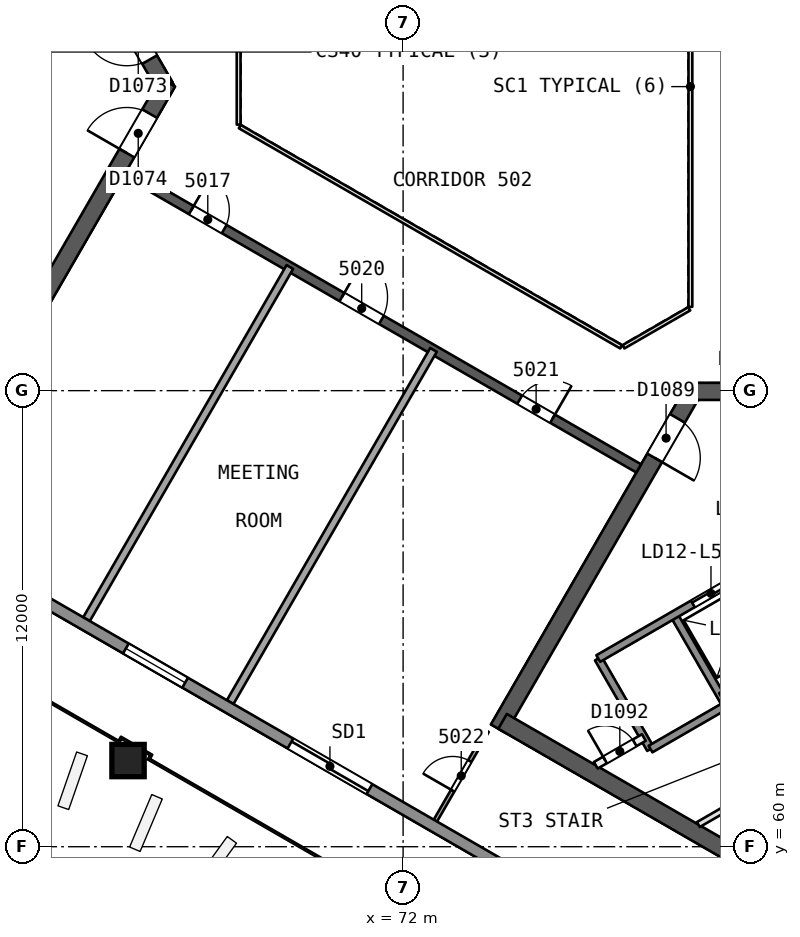
"""IFC4 building model, lengths in metres.
Left out: names, types, materials, properties, quantities, classifications, styles, units other than length and angle.
Written with IfcOpenShell. Run it as: python <this file> out.ifc"""

import sys

from ifc_helpers import new_model, si_unit, direction, frame, frame_2d, origin, origin_2d, place, context, subcontext, project, spatial, rectangle, extrude, element, fill, save


model = new_model("IFC4")
c1 = context("Model", 3, precision=1e-05, world=origin(), true_north=direction((0.0, 1.0)))
c2 = subcontext(c1, "Body", "Model", "MODEL_VIEW")
j1 = project(units=[si_unit("LENGTHUNIT", "METRE"), si_unit("PLANEANGLEUNIT", "RADIAN")], contexts=[c1])
p1 = place(None, origin())
s1 = spatial("IfcSite", under=j1, at=p1, CompositionType="ELEMENT")
p2 = place(p1, origin())
s2 = spatial("IfcBuilding", under=s1, at=p2, CompositionType="ELEMENT")
p3 = place(p2, frame((0.0, 0.0, 205.8)))
s3 = spatial("IfcBuildingStorey", under=s2, at=p3, CompositionType="ELEMENT", Elevation=205.8)
p4 = place(p3, frame((65.74, 80.0, 0.0), z_axis=(0.0, 0.0, 1.0), x_axis=(-0.499991857942, 0.866030104553, 0.0)))
e1 = element("IfcWall", 1, at=p4, inside=s3, PredefinedType="SHEAR", context=c2, shape_type="SweptSolid", body=[
    extrude(rectangle(XDim=10.25, YDim=0.45, at=frame_2d((5.125, 0.0))), origin(), (0.0, 0.0, 1.0), 3.7),
])
p5 = place(p4, frame((0.82, 0.0, 0.0)))
e2 = element("IfcOpeningElement", 2, at=p5, cuts=e1, PredefinedType="OPENING", context=c2, shape_type="SweptSolid", body=[
    extrude(rectangle(XDim=1.2, YDim=2.1, at=frame_2d((0.6, 1.05))), frame((0.0, 0.235, 0.0), z_axis=(0.0, -1.0, 0.0), x_axis=(1.0, 0.0, 0.0)), (0.0, 0.0, 1.0), 0.471),
])
p6 = place(p3, frame((60.728, 71.318, 0.0), z_axis=(0.0, 0.0, 1.0), x_axis=(0.500012416173, 0.866018235185, 0.0)))
e3 = element("IfcWall", 3, at=p6, inside=s3, PredefinedType="SHEAR", context=c2, shape_type="SweptSolid", body=[
    extrude(rectangle(XDim=10.155, YDim=0.45, at=frame_2d((5.078, 0.0))), origin(), (0.0, 0.0, 1.0), 3.7),
])
p7 = place(p6, frame((8.005, 0.0, 0.0)))
e4 = element("IfcOpeningElement", 4, at=p7, cuts=e3, PredefinedType="OPENING", context=c2, shape_type="SweptSolid", body=[
    extrude(rectangle(XDim=1.2, YDim=2.1, at=frame_2d((0.6, 1.05))), frame((0.0, 0.235, 0.0), z_axis=(0.0, -1.0, 0.0), x_axis=(1.0, 0.0, 0.0)), (0.0, 0.0, 1.0), 0.471),
])
p8 = place(p3, frame((79.63, 71.981, 0.0), z_axis=(0.0, 0.0, 1.0), x_axis=(-0.500002171595, -0.86602415001, 0.0)))
e5 = element("IfcWall", 5, at=p8, inside=s3, PredefinedType="SHEAR", context=c2, shape_type="SweptSolid", body=[
    extrude(rectangle(XDim=10.25, YDim=0.45, at=frame_2d((5.125, 0.0))), origin(), (0.0, 0.0, 1.0), 3.7),
])
p9 = place(p8, frame((0.82, 0.0, 0.0)))
e6 = element("IfcOpeningElement", 6, at=p9, cuts=e5, PredefinedType="OPENING", context=c2, shape_type="SweptSolid", body=[
    extrude(rectangle(XDim=1.2, YDim=2.1, at=frame_2d((0.6, 1.05))), frame((0.0, 0.235, 0.0), z_axis=(0.0, -1.0, 0.0), x_axis=(1.0, 0.0, 0.0)), (0.0, 0.0, 1.0), 0.471),
])
p10 = place(p3, frame((74.617, 63.299, 0.0), z_axis=(0.0, 0.0, 1.0), x_axis=(0.86602594008, -0.499999071108, 0.0)))
e7 = element("IfcWall", 7, at=p10, inside=s3, PredefinedType="SHEAR", context=c2, shape_type="SweptSolid", body=[
    extrude(rectangle(XDim=14.108, YDim=0.45, at=frame_2d((7.054, 0.0))), origin(), (0.0, 0.0, 1.0), 3.7),
])
p11 = place(p3, frame((89.655, 71.981, 0.0), z_axis=(0.0, 0.0, 1.0), x_axis=(-1.0, 0.0, 0.0)))
e8 = element("IfcWall", 8, at=p11, inside=s3, PredefinedType="SHEAR", context=c2, shape_type="SweptSolid", body=[
    extrude(rectangle(XDim=10.155, YDim=0.45, at=frame_2d((5.078, 0.0))), origin(), (0.0, 0.0, 1.0), 3.7),
])
p12 = place(p11, frame((8.005, 0.0, 0.0)))
e9 = element("IfcOpeningElement", 9, at=p12, cuts=e8, PredefinedType="OPENING", context=c2, shape_type="SweptSolid", body=[
    extrude(rectangle(XDim=1.2, YDim=2.1, at=frame_2d((0.6, 1.05))), frame((0.0, 0.235, 0.0), z_axis=(0.0, -1.0, 0.0), x_axis=(1.0, 0.0, 0.0)), (0.0, 0.0, 1.0), 0.471),
])
p13 = place(p3, frame((64.7, 77.748, 0.0), z_axis=(0.0, 0.0, 1.0), x_axis=(0.866026492143, -0.499998114903, 0.0)))
e10 = element("IfcWall", 10, at=p13, inside=s3, PredefinedType="SHEAR", context=c2, shape_type="SweptSolid", body=[
    extrude(rectangle(XDim=15.588, YDim=0.25, at=frame_2d((7.794, 0.0))), origin(), (0.0, 0.0, 1.0), 3.3),
])
p14 = place(p13, frame((1.994, 0.0, 0.0)))
e11 = element("IfcOpeningElement", 11, at=p14, cuts=e10, PredefinedType="OPENING", context=c2, shape_type="SweptSolid", body=[
    extrude(rectangle(XDim=1.0, YDim=2.1, at=frame_2d((0.5, 1.05))), frame((0.0, 0.135, 0.0), z_axis=(0.0, -1.0, 0.0), x_axis=(1.0, 0.0, 0.0)), (0.0, 0.0, 1.0), 0.271),
])
p15 = place(p13, frame((6.571, 0.0, 0.0)))
e12 = element("IfcOpeningElement", 12, at=p15, cuts=e10, PredefinedType="OPENING", context=c2, shape_type="SweptSolid", body=[
    extrude(rectangle(XDim=1.2, YDim=2.4, at=frame_2d((0.6, 1.2))), frame((0.0, 0.135, 0.0), z_axis=(0.0, -1.0, 0.0), x_axis=(1.0, 0.0, 0.0)), (0.0, 0.0, 1.0), 0.271),
])
p16 = place(p13, frame((11.971, 0.0, 0.0)))
e13 = element("IfcOpeningElement", 13, at=p16, cuts=e10, PredefinedType="OPENING", context=c2, shape_type="SweptSolid", body=[
    extrude(rectangle(XDim=1.0, YDim=2.1, at=frame_2d((0.5, 1.05))), frame((0.0, 0.135, 0.0), z_axis=(0.0, -1.0, 0.0), x_axis=(1.0, 0.0, 0.0)), (0.0, 0.0, 1.0), 0.271),
])
p17 = place(p3, frame((64.75, 62.246, 0.0), z_axis=(0.010093620709, 0.017482414954, 0.999796221231), x_axis=(-0.866022643586, 0.500004780773, 1.3036e-08)))
e14 = element("IfcColumn", 14, at=p17, inside=s3, PredefinedType="COLUMN", context=c2, shape_type="SweptSolid", body=[
    extrude(rectangle(XDim=0.85, YDim=0.85, at=origin_2d()), origin(), (0.0, 0.0, 1.0), 3.701),
])
for number, where, z_axis, x_axis in (
    (15, (63.669, 65.986, 0.0), (0.0, 0.0, 1.0), (0.5, 0.866, 0.0)),
    (16, (67.449, 63.804, 0.0), (0.0, 0.0, 1.0), (0.5, 0.866, 0.0)),
):
    element("IfcWall", number, at=place(p3, frame(where, z_axis=z_axis, x_axis=x_axis)), inside=s3, PredefinedType="PARTITIONING", context=c2, shape_type="SweptSolid", body=[
        extrude(rectangle(XDim=10.702, YDim=0.2, at=frame_2d((5.351, 0.0))), origin(), (0.0, 0.0, 1.0), 3.3),
    ])
p18 = place(p3, frame((72.849, 60.686, 0.0), z_axis=(0.0, 0.0, 1.0), x_axis=(0.499957886064, 0.866049716911, 0.0)))
e17 = element("IfcWall", 17, at=p18, inside=s3, PredefinedType="PARTITIONING", context=c2, shape_type="SweptSolid", body=[
    extrude(rectangle(XDim=2.723, YDim=0.1, at=frame_2d((1.361, 0.0))), origin(), (0.0, 0.0, 1.0), 3.3),
])
p19 = place(p18, frame((0.911, 0.0, 0.0)))
e18 = element("IfcOpeningElement", 18, at=p19, cuts=e17, PredefinedType="OPENING", context=c2, shape_type="SweptSolid", body=[
    extrude(rectangle(XDim=0.9, YDim=2.1, at=frame_2d((0.45, 1.05))), frame((0.0, 0.061, 0.0), z_axis=(0.0, -1.0, 0.0), x_axis=(1.0, 0.0, 0.0)), (0.0, 0.0, 1.0), 0.121),
])
p20 = place(p3, frame((88.377, 51.549, 0.0), z_axis=(0.0, 0.0, 1.0), x_axis=(-0.866024917385, 0.500000842468, 0.0)))
e19 = element("IfcWall", 19, at=p20, inside=s3, PredefinedType="SOLIDWALL", context=c2, shape_type="SweptSolid", body=[
    extrude(rectangle(XDim=51.621, YDim=0.3, at=frame_2d((25.811, 0.0))), origin(), (0.0, 0.0, 1.0), 3.3),
])
p21 = place(p20, frame((29.911, 0.0, 0.0)))
e20 = element("IfcOpeningElement", 20, at=p21, cuts=e19, PredefinedType="OPENING", context=c2, shape_type="SweptSolid", body=[
    extrude(rectangle(XDim=2.4, YDim=2.4, at=frame_2d((1.2, 1.2))), frame((0.0, 0.161, 0.0), z_axis=(0.0, -1.0, 0.0), x_axis=(1.0, 0.0, 0.0)), (0.0, 0.0, 1.0), 0.321),
])
p22 = place(p20, frame((40.147, 0.0, 0.0)))
e21 = element("IfcOpeningElement", 21, at=p22, cuts=e19, PredefinedType="OPENING", context=c2, shape_type="SweptSolid", body=[
    extrude(rectangle(XDim=2.4, YDim=2.4, at=frame_2d((1.2, 1.2))), frame((0.0, 0.161, 0.0), z_axis=(0.0, -1.0, 0.0), x_axis=(1.0, 0.0, 0.0)), (0.0, 0.0, 1.0), 0.321),
])
p23 = place(p20, frame((19.934, 0.0, 0.0)))
e22 = element("IfcOpeningElement", 22, at=p23, cuts=e19, PredefinedType="OPENING", context=c2, shape_type="SweptSolid", body=[
    extrude(rectangle(XDim=2.4, YDim=2.4, at=frame_2d((1.2, 1.2))), frame((0.0, 0.161, 0.0), z_axis=(0.0, -1.0, 0.0), x_axis=(1.0, 0.0, 0.0)), (0.0, 0.0, 1.0), 0.321),
])
p24 = place(p20, frame((9.107, 0.0, 0.0)))
e23 = element("IfcOpeningElement", 23, at=p24, cuts=e19, PredefinedType="OPENING", context=c2, shape_type="SweptSolid", body=[
    extrude(rectangle(XDim=2.4, YDim=2.4, at=frame_2d((1.2, 1.2))), frame((0.0, 0.161, 0.0), z_axis=(0.0, -1.0, 0.0), x_axis=(1.0, 0.0, 0.0)), (0.0, 0.0, 1.0), 0.321),
])
p25 = place(p20, frame((25.534, 0.0, 0.9)))
e24 = element("IfcOpeningElement", 24, at=p25, cuts=e19, PredefinedType="OPENING", context=c2, shape_type="SweptSolid", body=[
    extrude(rectangle(XDim=1.8, YDim=1.5, at=frame_2d((0.9, 0.75))), frame((0.0, 0.161, 0.0), z_axis=(0.0, -1.0, 0.0), x_axis=(1.0, 0.0, 0.0)), (0.0, 0.0, 1.0), 0.321),
])
for number, where, z_axis, x_axis in (
    (25, (77.135, 64.952, 0.0), (0.0, 0.0, 1.0), (0.5, -0.866, 0.0)),
    (26, (79.127, 66.102, 0.0), (0.0, 0.0, 1.0), (0.5, -0.866, 0.0)),
):
    element("IfcWall", number, at=place(p3, frame(where, z_axis=z_axis, x_axis=x_axis)), inside=s3, PredefinedType="SOLIDWALL", context=c2, shape_type="SweptSolid", body=[
        extrude(rectangle(XDim=2.75, YDim=0.2, at=frame_2d((1.375, 0.0))), origin(), (0.0, 0.0, 1.0), 3.3),
    ])
p26 = place(p3, frame((77.135, 64.952, 0.0), z_axis=(0.0, 0.0, 1.0), x_axis=(0.866031916153, 0.499988720078, 0.0)))
e27 = element("IfcWall", 27, at=p26, inside=s3, PredefinedType="SOLIDWALL", context=c2, shape_type="SweptSolid", body=[
    extrude(rectangle(XDim=11.35, YDim=0.2, at=frame_2d((5.675, 0.0))), origin(), (0.0, 0.0, 1.0), 3.3),
])
p27 = place(p26, frame((2.875, 0.0, 0.0)))
e28 = element("IfcOpeningElement", 28, at=p27, cuts=e27, PredefinedType="OPENING", context=c2, shape_type="SweptSolid", body=[
    extrude(rectangle(XDim=1.1, YDim=2.1, at=frame_2d((0.55, 1.05))), frame((0.0, 0.11, 0.0), z_axis=(0.0, -1.0, 0.0), x_axis=(1.0, 0.0, 0.0)), (0.0, 0.0, 1.0), 0.221),
])
p28 = place(p26, frame((5.125, 0.0, 0.0)))
e29 = element("IfcOpeningElement", 29, at=p28, cuts=e27, PredefinedType="OPENING", context=c2, shape_type="SweptSolid", body=[
    extrude(rectangle(XDim=1.1, YDim=2.1, at=frame_2d((0.55, 1.05))), frame((0.0, 0.11, 0.0), z_axis=(0.0, -1.0, 0.0), x_axis=(1.0, 0.0, 0.0)), (0.0, 0.0, 1.0), 0.221),
])
p29 = place(p26, frame((7.375, 0.0, 0.0)))
e30 = element("IfcOpeningElement", 30, at=p29, cuts=e27, PredefinedType="OPENING", context=c2, shape_type="SweptSolid", body=[
    extrude(rectangle(XDim=1.1, YDim=2.1, at=frame_2d((0.55, 1.05))), frame((0.0, 0.11, 0.0), z_axis=(0.0, -1.0, 0.0), x_axis=(1.0, 0.0, 0.0)), (0.0, 0.0, 1.0), 0.221),
])
p30 = place(p3, frame((77.07, 62.143, 0.0), z_axis=(0.0, 0.0, 1.0), x_axis=(0.866013036001, 0.500021421018, 0.0)))
e31 = element("IfcWall", 31, at=p30, inside=s3, PredefinedType="PARTITIONING", context=c2, shape_type="SweptSolid", body=[
    extrude(rectangle(XDim=1.461, YDim=0.2, at=frame_2d((0.73, 0.0))), origin(), (0.0, 0.0, 1.0), 3.3),
])
p31 = place(p30, frame((0.281, 0.0, 0.0)))
e32 = element("IfcOpeningElement", 32, at=p31, cuts=e31, PredefinedType="OPENING", context=c2, shape_type="SweptSolid", body=[
    extrude(rectangle(XDim=0.9, YDim=2.1, at=frame_2d((0.45, 1.05))), frame((0.0, 0.11, 0.0), z_axis=(0.0, -1.0, 0.0), x_axis=(1.0, 0.0, 0.0)), (0.0, 0.0, 1.0), 0.221),
])
p32 = place(p3, frame((80.367, 63.954, 0.0), z_axis=(0.0, 0.0, 1.0), x_axis=(0.866026575979, 0.499997969693, 0.0)))
e33 = element("IfcWall", 33, at=p32, inside=s3, PredefinedType="SOLIDWALL", context=c2, shape_type="SweptSolid", body=[
    extrude(rectangle(XDim=6.75, YDim=0.2, at=frame_2d((3.375, 0.0))), origin(), (0.0, 0.0, 1.0), 3.3),
])
p33 = place(p3, frame((78.51, 62.57, 0.0), z_axis=(0.0, 0.0, 1.0), x_axis=(0.866053019151, 0.499952165731, 0.0)))
e34 = element("IfcWall", 34, at=p33, inside=s3, PredefinedType="SOLIDWALL", context=c2, shape_type="SweptSolid", body=[
    extrude(rectangle(XDim=2.3, YDim=0.2, at=frame_2d((1.15, 0.0))), origin(), (0.0, 0.0, 1.0), 3.3),
])
p34 = place(p3, frame((79.77, 60.584, 0.0), z_axis=(0.0, 0.0, 1.0), x_axis=(0.866021168401, 0.500007335828, 0.0)))
e35 = element("IfcWall", 35, at=p34, inside=s3, PredefinedType="PARTITIONING", context=c2, shape_type="SweptSolid", body=[
    extrude(rectangle(XDim=2.077, YDim=0.15, at=frame_2d((1.039, 0.0))), origin(), (0.0, 0.0, 1.0), 3.3),
])
p35 = place(p3, frame((79.56, 74.206, 0.0), z_axis=(0.0, 0.0, 1.0), x_axis=(0.0, 1.0, 0.0)))
e36 = element("IfcWall", 36, at=p35, inside=s3, PredefinedType="PARTITIONING", context=c2, shape_type="SweptSolid", body=[
    extrude(rectangle(XDim=11.588, YDim=0.1, at=frame_2d((5.794, 0.0))), origin(), (0.0, 0.0, 1.0), 3.3),
])
p36 = place(p3, frame((67.672, 81.0, 0.0), z_axis=(0.0, 0.0, 1.0), x_axis=(0.0, -1.0, 0.0)))
e37 = element("IfcWall", 37, at=p36, inside=s3, PredefinedType="PARTITIONING", context=c2, shape_type="SweptSolid", body=[
    extrude(rectangle(XDim=2.0, YDim=0.1, at=frame_2d((1.0, 0.0))), origin(), (0.0, 0.0, 1.0), 3.3),
])
p37 = place(p3, frame((67.702, 78.948, 0.0), z_axis=(0.0, 0.0, 1.0), x_axis=(0.866026658274, -0.499997827154, 0.0)))
e38 = element("IfcWall", 38, at=p37, inside=s3, PredefinedType="PARTITIONING", context=c2, shape_type="SweptSolid", body=[
    extrude(rectangle(XDim=11.588, YDim=0.1, at=frame_2d((5.794, 0.0))), origin(), (0.0, 0.0, 1.0), 3.3),
])
p38 = place(p3, frame((77.798, 73.154, 0.0), z_axis=(0.0, 0.0, 1.0), x_axis=(0.866041268327, 0.499972520799, 0.0)))
e39 = element("IfcWall", 39, at=p38, inside=s3, PredefinedType="PARTITIONING", context=c2, shape_type="SweptSolid", body=[
    extrude(rectangle(XDim=2.0, YDim=0.1, at=frame_2d((1.0, 0.0))), origin(), (0.0, 0.0, 1.0), 3.3),
])
p39 = place(p14, origin())
e40 = element("IfcDoor", 40, at=p39, inside=s3, OperationType="SINGLE_SWING_LEFT", PredefinedType="NOTDEFINED", context=c2, shape_type="SweptSolid", body=[
    extrude(rectangle(XDim=1.0, YDim=2.1, at=frame_2d((0.5, 1.05))), frame((0.0, 0.025, 0.0), z_axis=(0.0, -1.0, 0.0), x_axis=(1.0, 0.0, 0.0)), (0.0, 0.0, 1.0), 0.05),
])
fill(e11, e40)
p40 = place(p15, origin())
e41 = element("IfcDoor", 41, at=p40, inside=s3, OperationType="SINGLE_SWING_LEFT", PredefinedType="NOTDEFINED", context=c2, shape_type="SweptSolid", body=[
    extrude(rectangle(XDim=1.2, YDim=2.4, at=frame_2d((0.6, 1.2))), frame((0.0, 0.025, 0.0), z_axis=(0.0, -1.0, 0.0), x_axis=(1.0, 0.0, 0.0)), (0.0, 0.0, 1.0), 0.05),
])
fill(e12, e41)
p41 = place(p16, origin())
e42 = element("IfcDoor", 42, at=p41, inside=s3, OperationType="SINGLE_SWING_RIGHT", PredefinedType="NOTDEFINED", context=c2, shape_type="SweptSolid", body=[
    extrude(rectangle(XDim=1.0, YDim=2.1, at=frame_2d((0.5, 1.05))), frame((0.0, 0.025, 0.0), z_axis=(0.0, -1.0, 0.0), x_axis=(1.0, 0.0, 0.0)), (0.0, 0.0, 1.0), 0.05),
])
fill(e13, e42)
p42 = place(p19, origin())
e43 = element("IfcDoor", 43, at=p42, inside=s3, OperationType="SINGLE_SWING_LEFT", PredefinedType="NOTDEFINED", context=c2, shape_type="SweptSolid", body=[
    extrude(rectangle(XDim=0.9, YDim=2.1, at=frame_2d((0.45, 1.05))), frame((0.0, 0.025, 0.0), z_axis=(0.0, -1.0, 0.0), x_axis=(1.0, 0.0, 0.0)), (0.0, 0.0, 1.0), 0.05),
])
fill(e18, e43)
p43 = place(p23, origin())
e44 = element("IfcDoor", 44, at=p43, inside=s3, OperationType="SLIDING_TO_LEFT", PredefinedType="NOTDEFINED", context=c2, shape_type="SweptSolid", body=[
    extrude(rectangle(XDim=2.4, YDim=2.4, at=frame_2d((1.2, 1.2))), frame((0.0, 0.025, 0.0), z_axis=(0.0, -1.0, 0.0), x_axis=(1.0, 0.0, 0.0)), (0.0, 0.0, 1.0), 0.05),
])
fill(e22, e44)
p44 = place(p25, origin())
e45 = element("IfcWindow", 45, at=p44, inside=s3, PartitioningType="SINGLE_PANEL", PredefinedType="WINDOW", context=c2, shape_type="SweptSolid", body=[
    extrude(rectangle(XDim=1.8, YDim=1.5, at=frame_2d((0.9, 0.75))), frame((0.0, 0.03, 0.0), z_axis=(0.0, -1.0, 0.0), x_axis=(1.0, 0.0, 0.0)), (0.0, 0.0, 1.0), 0.06),
])
fill(e24, e45)
p45 = place(p5, origin())
e46 = element("IfcDoor", 46, at=p45, inside=s3, OperationType="SINGLE_SWING_RIGHT", PredefinedType="NOTDEFINED", context=c2, shape_type="SweptSolid", body=[
    extrude(rectangle(XDim=1.2, YDim=2.1, at=frame_2d((0.6, 1.05))), frame((0.0, 0.025, 0.0), z_axis=(0.0, -1.0, 0.0), x_axis=(1.0, 0.0, 0.0)), (0.0, 0.0, 1.0), 0.05),
])
fill(e2, e46)
p46 = place(p7, origin())
e47 = element("IfcDoor", 47, at=p46, inside=s3, OperationType="SINGLE_SWING_LEFT", PredefinedType="NOTDEFINED", context=c2, shape_type="SweptSolid", body=[
    extrude(rectangle(XDim=1.2, YDim=2.1, at=frame_2d((0.6, 1.05))), frame((0.0, 0.025, 0.0), z_axis=(0.0, -1.0, 0.0), x_axis=(1.0, 0.0, 0.0)), (0.0, 0.0, 1.0), 0.05),
])
fill(e4, e47)
p47 = place(p9, origin())
e48 = element("IfcDoor", 48, at=p47, inside=s3, OperationType="SINGLE_SWING_RIGHT", PredefinedType="NOTDEFINED", context=c2, shape_type="SweptSolid", body=[
    extrude(rectangle(XDim=1.2, YDim=2.1, at=frame_2d((0.6, 1.05))), frame((0.0, 0.025, 0.0), z_axis=(0.0, -1.0, 0.0), x_axis=(1.0, 0.0, 0.0)), (0.0, 0.0, 1.0), 0.05),
])
fill(e6, e48)
p48 = place(p27, origin())
e49 = element("IfcDoor", 49, at=p48, inside=s3, OperationType="SLIDING_TO_LEFT", PredefinedType="NOTDEFINED", context=c2, shape_type="SweptSolid", body=[
    extrude(rectangle(XDim=1.1, YDim=2.1, at=frame_2d((0.55, 1.05))), frame((0.0, 0.025, 0.0), z_axis=(0.0, -1.0, 0.0), x_axis=(1.0, 0.0, 0.0)), (0.0, 0.0, 1.0), 0.05),
])
fill(e28, e49)
p49 = place(p31, origin())
e50 = element("IfcDoor", 50, at=p49, inside=s3, OperationType="SINGLE_SWING_LEFT", PredefinedType="NOTDEFINED", context=c2, shape_type="SweptSolid", body=[
    extrude(rectangle(XDim=0.9, YDim=2.1, at=frame_2d((0.45, 1.05))), frame((0.0, 0.025, 0.0), z_axis=(0.0, -1.0, 0.0), x_axis=(1.0, 0.0, 0.0)), (0.0, 0.0, 1.0), 0.05),
])
fill(e32, e50)
save(model, sys.argv[1])
